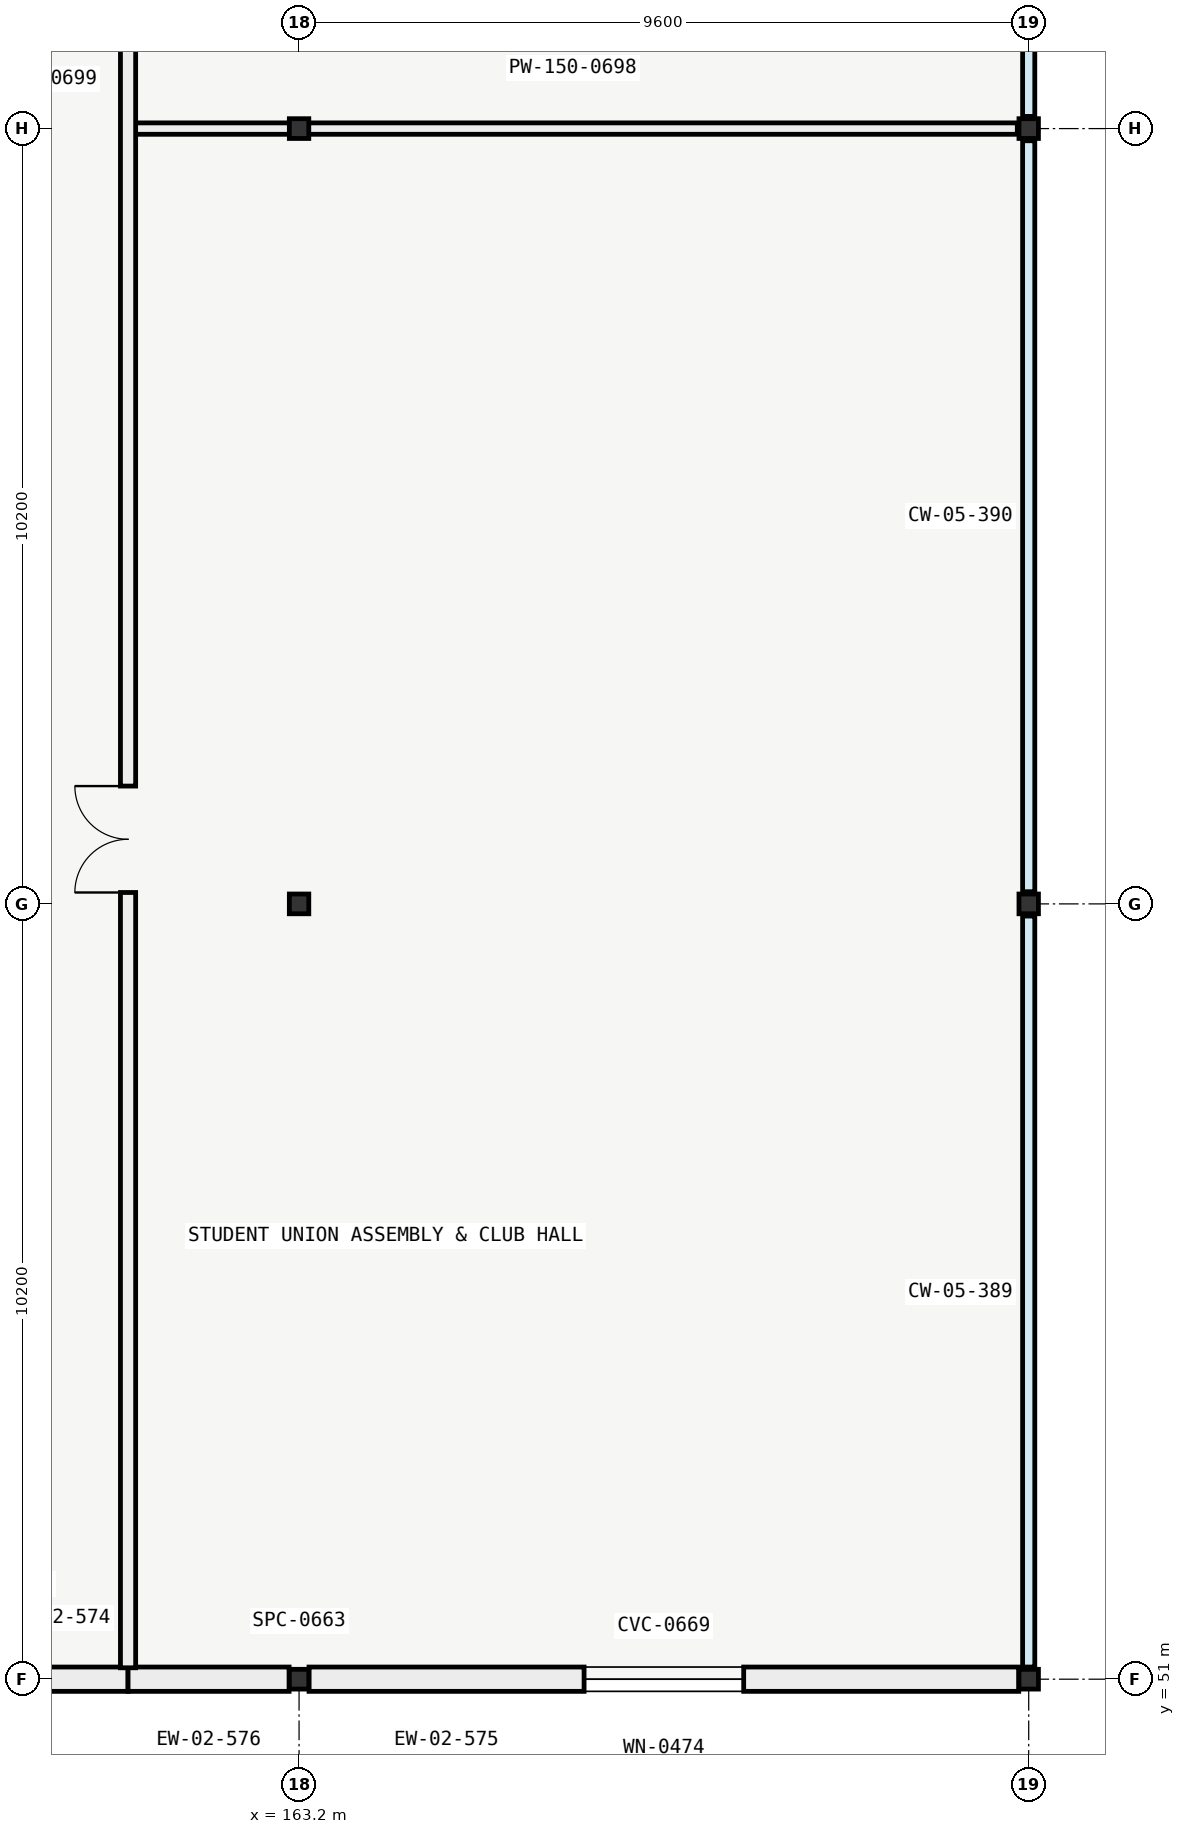
"""IFC4 building model, lengths in metres.
Left out: names, types, materials, properties, quantities, classifications, styles, units other than length and angle.
Written with IfcOpenShell. Run it as: python <this file> out.ifc"""

import sys

from ifc_helpers import new_model, si_unit, direction, frame, frame_2d, origin, origin_2d, place, context, subcontext, project, spatial, rectangle, i_section, extrude, element, fill, save


model = new_model("IFC4")
c1 = context("Model", 3, precision=1e-05, world=origin(), true_north=direction((0.0, 1.0)))
c2 = subcontext(c1, "Body", "Model", "MODEL_VIEW")
j1 = project(units=[si_unit("LENGTHUNIT", "METRE"), si_unit("PLANEANGLEUNIT", "RADIAN")], contexts=[c1])
p1 = place(None, origin())
s1 = spatial("IfcSite", under=j1, at=p1, CompositionType="ELEMENT")
p2 = place(p1, origin())
s2 = spatial("IfcBuilding", under=s1, at=p2, CompositionType="ELEMENT")
p3 = place(p2, frame((0.0, 0.0, 5.4)))
s3 = spatial("IfcBuildingStorey", under=s2, at=p3, CompositionType="ELEMENT", Elevation=5.4)
for number, where, z_axis, x_axis in (
    (1, (163.2, 51.0, 0.0), (0.0, 0.0, 1.0), (1.0, 0.0, 0.0)),
    (2, (163.2, 61.2, 0.0), (0.0, 0.0, 1.0), (1.0, 0.0, 0.0)),
    (3, (163.2, 71.4, 0.0), (0.0, 0.0, 1.0), (1.0, 0.0, 0.0)),
    (4, (172.8, 51.0, 0.0), (0.0, 0.0, 1.0), (1.0, 0.0, 0.0)),
    (5, (172.8, 61.2, 0.0), (0.0, 0.0, 1.0), (1.0, 0.0, 0.0)),
    (6, (172.8, 71.4, 0.0), (0.0, 0.0, 1.0), (1.0, 0.0, 0.0)),
):
    element("IfcColumn", number, at=place(p3, frame(where, z_axis=z_axis, x_axis=x_axis)), inside=s3, PredefinedType="COLUMN", context=c2, shape_type="SweptSolid", body=[
        extrude(i_section(OverallWidth=0.256, OverallDepth=0.26, WebThickness=0.01, FlangeThickness=0.017, FilletRadius=0.014, at=origin_2d()), origin(), (0.0, 0.0, 1.0), 4.2),
    ])
p4 = place(p3, frame((160.95, 51.0, 0.0), z_axis=(0.0, 0.0, 1.0), x_axis=(-1.0, 0.0, 0.0)))
e7 = element("IfcWall", 7, at=p4, inside=s3, PredefinedType="SOLIDWALL", context=c2, shape_type="SweptSolid", body=[
    extrude(rectangle(XDim=3.2, YDim=0.32, at=frame_2d((1.6, 0.0))), origin(), (0.0, 0.0, 1.0), 3.46),
])
p5 = place(p4, frame((1.15, 0.0, 0.85)))
e8 = element("IfcOpeningElement", 8, at=p5, cuts=e7, PredefinedType="OPENING", context=c2, shape_type="SweptSolid", body=[
    extrude(rectangle(XDim=0.9, YDim=2.2, at=frame_2d((0.45, 1.1))), frame((0.0, 0.17, 0.0), z_axis=(0.0, -1.0, 0.0), x_axis=(1.0, 0.0, 0.0)), (0.0, 0.0, 1.0), 0.34),
])
p6 = place(p3, frame((172.669, 51.0, 0.0), z_axis=(0.0, 0.0, 1.0), x_axis=(-1.0, 0.0, 0.0)))
e9 = element("IfcWall", 9, at=p6, inside=s3, PredefinedType="SOLIDWALL", context=c2, shape_type="SweptSolid", body=[
    extrude(rectangle(XDim=9.338, YDim=0.32, at=frame_2d((4.669, 0.0))), origin(), (0.0, 0.0, 1.0), 3.46),
])
p7 = place(p6, frame((3.619, 0.0, 0.85)))
e10 = element("IfcOpeningElement", 10, at=p7, cuts=e9, PredefinedType="OPENING", context=c2, shape_type="SweptSolid", body=[
    extrude(rectangle(XDim=2.1, YDim=2.4, at=frame_2d((1.05, 1.2))), frame((0.0, 0.17, 0.0), z_axis=(0.0, -1.0, 0.0), x_axis=(1.0, 0.0, 0.0)), (0.0, 0.0, 1.0), 0.34),
])
p8 = place(p3, frame((163.069, 51.0, 0.0), z_axis=(0.0, 0.0, 1.0), x_axis=(-1.0, 0.0, 0.0)))
e11 = element("IfcWall", 11, at=p8, inside=s3, PredefinedType="SOLIDWALL", context=c2, shape_type="SweptSolid", body=[
    extrude(rectangle(XDim=2.119, YDim=0.32, at=frame_2d((1.06, 0.0))), origin(), (0.0, 0.0, 1.0), 3.46),
])
p9 = place(p3, frame((160.95, 71.4, 0.0), z_axis=(0.0, 0.0, 1.0), x_axis=(1.0, 0.0, 0.0)))
e12 = element("IfcWall", 12, at=p9, inside=s3, PredefinedType="PARTITIONING", context=c2, shape_type="SweptSolid", body=[
    extrude(rectangle(XDim=11.7, YDim=0.15, at=frame_2d((5.85, 0.0))), origin(), (0.0, 0.0, 1.0), 3.44),
])
p10 = place(p3, frame((160.95, 51.15, 0.0), z_axis=(0.0, 0.0, 1.0), x_axis=(0.0, 1.0, 0.0)))
e13 = element("IfcWall", 13, at=p10, inside=s3, PredefinedType="PARTITIONING", context=c2, shape_type="SweptSolid", body=[
    extrude(rectangle(XDim=40.5, YDim=0.2, at=frame_2d((20.25, 0.0))), origin(), (0.0, 0.0, 1.0), 3.44),
])
p11 = place(p10, frame((10.2, 0.0, 0.0)))
e14 = element("IfcOpeningElement", 14, at=p11, cuts=e13, PredefinedType="OPENING", context=c2, shape_type="SweptSolid", body=[
    extrude(rectangle(XDim=1.4, YDim=2.2, at=frame_2d((0.7, 1.1))), frame((0.0, 0.11, 0.0), z_axis=(0.0, -1.0, 0.0), x_axis=(1.0, 0.0, 0.0)), (0.0, 0.0, 1.0), 0.22),
])
p12 = place(p10, frame((30.2, 0.0, 0.0)))
e15 = element("IfcOpeningElement", 15, at=p12, cuts=e13, PredefinedType="OPENING", context=c2, shape_type="SweptSolid", body=[
    extrude(rectangle(XDim=1.4, YDim=2.2, at=frame_2d((0.7, 1.1))), frame((0.0, 0.11, 0.0), z_axis=(0.0, -1.0, 0.0), x_axis=(1.0, 0.0, 0.0)), (0.0, 0.0, 1.0), 0.22),
])
p13 = place(p7, origin())
e16 = element("IfcWindow", 16, at=p13, inside=s3, PartitioningType="SINGLE_PANEL", PredefinedType="WINDOW", context=c2, shape_type="SweptSolid", body=[
    extrude(rectangle(XDim=2.1, YDim=2.4, at=frame_2d((1.05, 1.2))), frame((0.0, 0.03, 0.0), z_axis=(0.0, -1.0, 0.0), x_axis=(1.0, 0.0, 0.0)), (0.0, 0.0, 1.0), 0.06),
])
fill(e10, e16)
p14 = place(p11, origin())
e17 = element("IfcDoor", 17, at=p14, inside=s3, OperationType="DOUBLE_DOOR_SINGLE_SWING", PredefinedType="DOOR", context=c2, shape_type="SweptSolid", body=[
    extrude(rectangle(XDim=1.4, YDim=2.2, at=frame_2d((0.7, 1.1))), frame((0.0, 0.025, 0.0), z_axis=(0.0, -1.0, 0.0), x_axis=(1.0, 0.0, 0.0)), (0.0, 0.0, 1.0), 0.05),
])
fill(e14, e17)
save(model, sys.argv[1])
